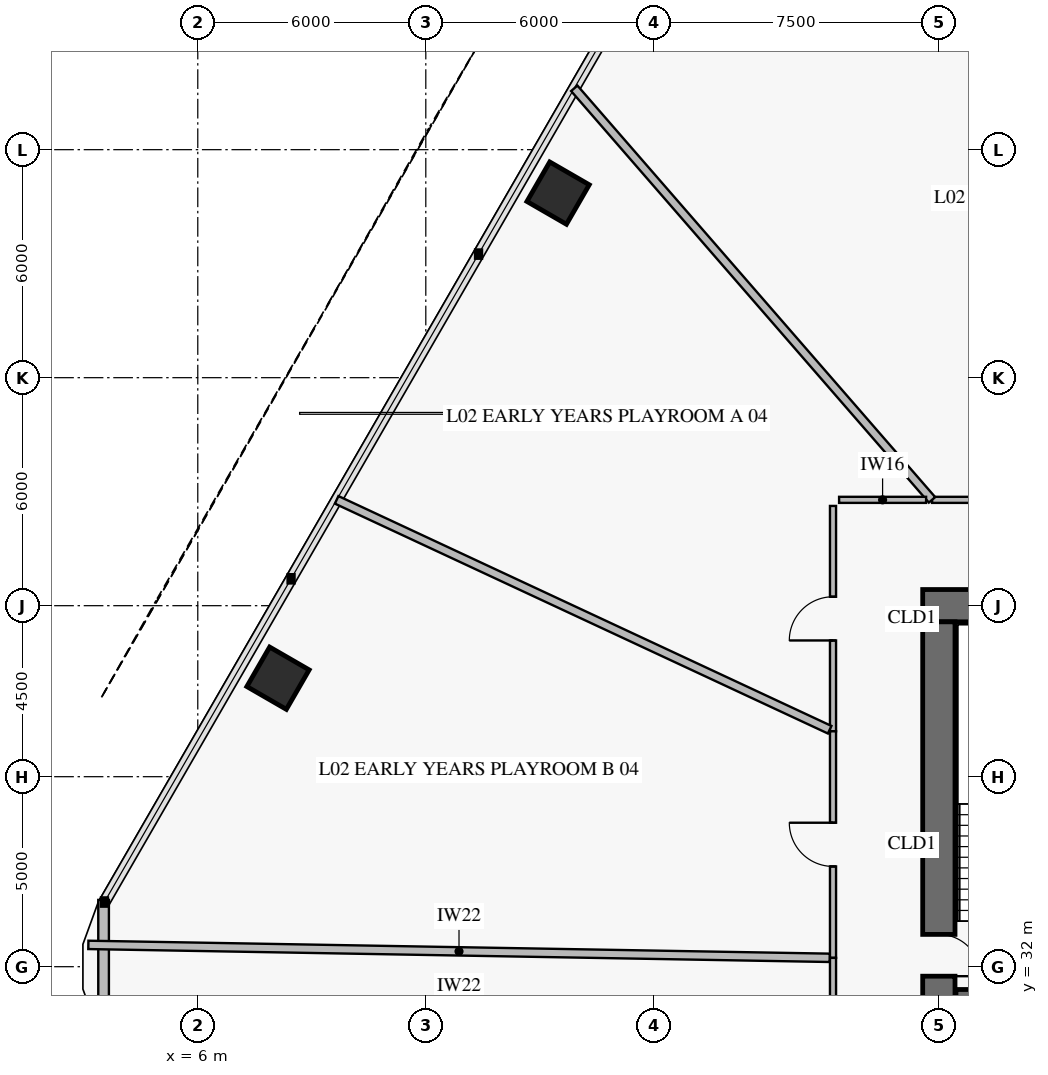
"""IFC4 building model, lengths in metres.
Left out: names, types, materials, properties, quantities, classifications, styles, units other than length and angle.
Written with IfcOpenShell. Run it as: python <this file> out.ifc"""

import sys

from ifc_helpers import new_model, si_unit, direction, frame, frame_2d, origin, origin_2d, place, context, subcontext, project, spatial, rectangle, extrude, element, fill, save


model = new_model("IFC4")
c1 = context("Model", 3, precision=1e-05, world=origin(), true_north=direction((0.0, 1.0)))
c2 = subcontext(c1, "Body", "Model", "MODEL_VIEW")
j1 = project(units=[si_unit("LENGTHUNIT", "METRE"), si_unit("PLANEANGLEUNIT", "RADIAN")], contexts=[c1])
p1 = place(None, origin())
s1 = spatial("IfcSite", under=j1, at=p1, CompositionType="ELEMENT")
p2 = place(p1, origin())
s2 = spatial("IfcBuilding", under=s1, at=p2, CompositionType="ELEMENT")
p3 = place(p2, frame((0.0, 0.0, 7.8)))
s3 = spatial("IfcBuildingStorey", under=s2, at=p3, CompositionType="ELEMENT", Elevation=7.8)
p4 = place(p3, frame((36.75, 41.5, 0.0), z_axis=(0.0, 0.0, 1.0), x_axis=(-1.0, 0.0, 0.0)))
e1 = element("IfcWall", 1, at=p4, inside=s3, PredefinedType="SHEAR", context=c2, shape_type="SweptSolid", body=[
    extrude(rectangle(XDim=11.675, YDim=0.85, at=frame_2d((5.837, 0.0))), origin(), (0.0, 0.0, 1.0), 4.2),
])
p5 = place(p4, frame((4.25, 0.0, 0.0)))
e2 = element("IfcOpeningElement", 2, at=p5, cuts=e1, PredefinedType="OPENING", context=c2, shape_type="SweptSolid", body=[
    extrude(rectangle(XDim=1.1, YDim=2.15, at=frame_2d((0.55, 1.075))), frame((0.0, 0.437, 0.0), z_axis=(0.0, -1.0, 0.0), x_axis=(1.0, 0.0, 0.0)), (0.0, 0.0, 1.0), 0.874),
])
p6 = place(p3, frame((25.5, 22.925, 0.0), z_axis=(0.0, 0.0, 1.0), x_axis=(0.0, 1.0, 0.0)))
e3 = element("IfcWall", 3, at=p6, inside=s3, PredefinedType="SHEAR", context=c2, shape_type="SweptSolid", body=[
    extrude(rectangle(XDim=18.15, YDim=0.85, at=frame_2d((9.075, 0.0))), origin(), (0.0, 0.0, 1.0), 4.2),
])
p7 = place(p6, frame((8.825, 0.0, 0.0)))
e4 = element("IfcOpeningElement", 4, at=p7, cuts=e3, PredefinedType="OPENING", context=c2, shape_type="SweptSolid", body=[
    extrude(rectangle(XDim=1.1, YDim=2.15, at=frame_2d((0.55, 1.075))), frame((0.0, 0.437, 0.0), z_axis=(0.0, -1.0, 0.0), x_axis=(1.0, 0.0, 0.0)), (0.0, 0.0, 1.0), 0.874),
])
for number, where, z_axis, x_axis in (
    (5, (15.481, 52.357, 0.0), (0.0, 0.0, 1.0), (-0.5, -0.866, 0.0)),
    (6, (8.111, 39.592, 0.0), (0.0, 0.0, 1.0), (-0.5, -0.866, 0.0)),
):
    element("IfcColumn", number, at=place(p3, frame(where, z_axis=z_axis, x_axis=x_axis)), inside=s3, PredefinedType="COLUMN", context=c2, shape_type="SweptSolid", body=[
        extrude(rectangle(XDim=1.2, YDim=1.2, at=origin_2d()), origin(), (0.0, 0.0, 1.0), 3.92),
    ])
p8 = place(p3, frame((3.521, 30.242, 0.0), z_axis=(0.0, 0.0, 1.0), x_axis=(0.0, 1.0, 0.0)))
e7 = element("IfcWall", 7, at=p8, inside=s3, PredefinedType="SOLIDWALL", context=c2, shape_type="SweptSolid", body=[
    extrude(rectangle(XDim=3.515, YDim=0.28, at=frame_2d((1.758, 0.0))), origin(), (0.0, 0.0, 1.0), 3.92),
])
p9 = place(p3, frame((25.95, 31.275, 0.0), z_axis=(0.0, 0.0, 1.0), x_axis=(1.0, 0.0, 0.0)))
e8 = element("IfcWall", 8, at=p9, inside=s3, PredefinedType="SOLIDWALL", context=c2, shape_type="SweptSolid", body=[
    extrude(rectangle(XDim=20.1, YDim=0.25, at=frame_2d((10.05, 0.0))), origin(), (0.0, 0.0, 1.0), 4.2),
])
p10 = place(p9, frame((2.6, 0.0, 0.0)))
e9 = element("IfcOpeningElement", 9, at=p10, cuts=e8, PredefinedType="OPENING", context=c2, shape_type="SweptSolid", body=[
    extrude(rectangle(XDim=1.1, YDim=2.15, at=frame_2d((0.55, 1.075))), frame((0.0, 0.137, 0.0), z_axis=(0.0, -1.0, 0.0), x_axis=(1.0, 0.0, 0.0)), (0.0, 0.0, 1.0), 0.274),
])
p11 = place(p9, frame((10.6, 0.0, 0.0)))
e10 = element("IfcOpeningElement", 10, at=p11, cuts=e8, PredefinedType="OPENING", context=c2, shape_type="SweptSolid", body=[
    extrude(rectangle(XDim=1.1, YDim=2.15, at=frame_2d((0.55, 1.075))), frame((0.0, 0.137, 0.0), z_axis=(0.0, -1.0, 0.0), x_axis=(1.0, 0.0, 0.0)), (0.0, 0.0, 1.0), 0.274),
])
p12 = place(p9, frame((16.35, 0.0, 0.0)))
e11 = element("IfcOpeningElement", 11, at=p12, cuts=e8, PredefinedType="OPENING", context=c2, shape_type="SweptSolid", body=[
    extrude(rectangle(XDim=1.1, YDim=2.15, at=frame_2d((0.55, 1.075))), frame((0.0, 0.137, 0.0), z_axis=(0.0, -1.0, 0.0), x_axis=(1.0, 0.0, 0.0)), (0.0, 0.0, 1.0), 0.274),
])
p13 = place(p3, frame((37.075, 44.285, 0.0), z_axis=(0.0, 0.0, 1.0), x_axis=(-1.0, 0.0, 0.0)))
e12 = element("IfcWall", 12, at=p13, inside=s3, PredefinedType="PARTITIONING", context=c2, shape_type="SweptSolid", body=[
    extrude(rectangle(XDim=11.754, YDim=0.16, at=frame_2d((5.877, 0.0))), origin(), (0.0, 0.0, 1.0), 3.22),
])
p14 = place(p13, frame((5.302, 0.0, 0.0)))
e13 = element("IfcOpeningElement", 13, at=p14, cuts=e12, PredefinedType="OPENING", context=c2, shape_type="SweptSolid", body=[
    extrude(rectangle(XDim=1.15, YDim=2.2, at=frame_2d((0.575, 1.1))), frame((0.0, 0.092, 0.0), z_axis=(0.0, -1.0, 0.0), x_axis=(1.0, 0.0, 0.0)), (0.0, 0.0, 1.0), 0.184),
])
p15 = place(p3, frame((22.715, 44.125, 0.0), z_axis=(0.0, 0.0, 1.0), x_axis=(0.0, -1.0, 0.0)))
e14 = element("IfcWall", 14, at=p15, inside=s3, PredefinedType="PARTITIONING", context=c2, shape_type="SweptSolid", body=[
    extrude(rectangle(XDim=5.93, YDim=0.16, at=frame_2d((2.965, 0.0))), origin(), (0.0, 0.0, 1.0), 3.92),
])
p16 = place(p15, frame((2.39, 0.0, 0.0)))
e15 = element("IfcOpeningElement", 15, at=p16, cuts=e14, PredefinedType="OPENING", context=c2, shape_type="SweptSolid", body=[
    extrude(rectangle(XDim=1.15, YDim=2.2, at=frame_2d((0.575, 1.1))), frame((0.0, 0.092, 0.0), z_axis=(0.0, -1.0, 0.0), x_axis=(1.0, 0.0, 0.0)), (0.0, 0.0, 1.0), 0.184),
])
p17 = place(p3, frame((22.715, 38.195, 0.0), z_axis=(0.0, 0.0, 1.0), x_axis=(0.0, -1.0, 0.0)))
e16 = element("IfcWall", 16, at=p17, inside=s3, PredefinedType="PARTITIONING", context=c2, shape_type="SweptSolid", body=[
    extrude(rectangle(XDim=5.963, YDim=0.16, at=frame_2d((2.981, 0.0))), origin(), (0.0, 0.0, 1.0), 3.22),
])
p18 = place(p17, frame((2.406, 0.0, 0.0)))
e17 = element("IfcOpeningElement", 17, at=p18, cuts=e16, PredefinedType="OPENING", context=c2, shape_type="SweptSolid", body=[
    extrude(rectangle(XDim=1.15, YDim=2.2, at=frame_2d((0.575, 1.1))), frame((0.0, 0.092, 0.0), z_axis=(0.0, -1.0, 0.0), x_axis=(1.0, 0.0, 0.0)), (0.0, 0.0, 1.0), 0.184),
])
p19 = place(p3, frame((22.715, 32.232, 0.0), z_axis=(0.0, 0.0, 1.0), x_axis=(0.0, -1.0, 0.0)))
e18 = element("IfcWall", 18, at=p19, inside=s3, PredefinedType="PARTITIONING", context=c2, shape_type="SweptSolid", body=[
    extrude(rectangle(XDim=5.599, YDim=0.16, at=frame_2d((2.8, 0.0))), origin(), (0.0, 0.0, 1.0), 3.22),
])
p20 = place(p19, frame((2.225, 0.0, 0.0)))
e19 = element("IfcOpeningElement", 19, at=p20, cuts=e18, PredefinedType="OPENING", context=c2, shape_type="SweptSolid", body=[
    extrude(rectangle(XDim=1.15, YDim=2.2, at=frame_2d((0.575, 1.1))), frame((0.0, 0.092, 0.0), z_axis=(0.0, -1.0, 0.0), x_axis=(1.0, 0.0, 0.0)), (0.0, 0.0, 1.0), 0.184),
])
p21 = place(p3, frame((25.321, 44.285, 0.0), z_axis=(0.0, 0.0, 1.0), x_axis=(-0.656060762546, 0.754708073263, 0.0)))
e20 = element("IfcWall", 20, at=p21, inside=s3, PredefinedType="PARTITIONING", context=c2, shape_type="SweptSolid", body=[
    extrude(rectangle(XDim=14.349, YDim=0.22, at=frame_2d((7.175, 0.0))), origin(), (0.0, 0.0, 1.0), 3.17),
])
p22 = place(p3, frame((22.627, 38.236, 0.0), z_axis=(0.0, 0.0, 1.0), x_axis=(-0.906309468756, 0.422614655263, 0.0)))
e21 = element("IfcWall", 21, at=p22, inside=s3, PredefinedType="PARTITIONING", context=c2, shape_type="SweptSolid", body=[
    extrude(rectangle(XDim=14.313, YDim=0.22, at=frame_2d((7.157, 0.0))), origin(), (0.0, 0.0, 1.0), 3.17),
])
p23 = place(p3, frame((25.164, 44.285, 0.0), z_axis=(0.0, 0.0, 1.0), x_axis=(-1.0, 0.0, 0.0)))
e22 = element("IfcWall", 22, at=p23, inside=s3, PredefinedType="PARTITIONING", context=c2, shape_type="SweptSolid", body=[
    extrude(rectangle(XDim=2.289, YDim=0.16, at=frame_2d((1.145, 0.0))), origin(), (0.0, 0.0, 1.0), 3.22),
])
p24 = place(p3, frame((22.627, 32.233, 0.0), z_axis=(0.0, 0.0, 1.0), x_axis=(-0.999847613209, 0.017457100559, 0.0)))
e23 = element("IfcWall", 23, at=p24, inside=s3, PredefinedType="PARTITIONING", context=c2, shape_type="SweptSolid", body=[
    extrude(rectangle(XDim=19.509, YDim=0.22, at=frame_2d((9.755, 0.0))), origin(), (0.0, 0.0, 1.0), 3.17),
])
p25 = place(p7, frame((1.1, 0.0, 0.0), z_axis=(0.0, 0.0, 1.0), x_axis=(-1.0, 0.0, 0.0)))
e24 = element("IfcDoor", 24, at=p25, inside=s3, OperationType="SINGLE_SWING_RIGHT", PredefinedType="USERDEFINED", context=c2, shape_type="SweptSolid", body=[
    extrude(rectangle(XDim=1.1, YDim=2.15, at=frame_2d((0.55, 1.075))), frame((0.0, 0.025, 0.0), z_axis=(0.0, -1.0, 0.0), x_axis=(1.0, 0.0, 0.0)), (0.0, 0.0, 1.0), 0.05),
])
fill(e4, e24)
p26 = place(p16, frame((1.15, 0.0, 0.0), z_axis=(0.0, 0.0, 1.0), x_axis=(-1.0, 0.0, 0.0)))
e25 = element("IfcDoor", 25, at=p26, inside=s3, OperationType="SINGLE_SWING_LEFT", PredefinedType="DOOR", context=c2, shape_type="SweptSolid", body=[
    extrude(rectangle(XDim=1.15, YDim=2.2, at=frame_2d((0.575, 1.1))), frame((0.0, 0.025, 0.0), z_axis=(0.0, -1.0, 0.0), x_axis=(1.0, 0.0, 0.0)), (0.0, 0.0, 1.0), 0.05),
])
fill(e15, e25)
p27 = place(p18, frame((1.15, 0.0, 0.0), z_axis=(0.0, 0.0, 1.0), x_axis=(-1.0, 0.0, 0.0)))
e26 = element("IfcDoor", 26, at=p27, inside=s3, OperationType="SINGLE_SWING_RIGHT", PredefinedType="DOOR", context=c2, shape_type="SweptSolid", body=[
    extrude(rectangle(XDim=1.15, YDim=2.2, at=frame_2d((0.575, 1.1))), frame((0.0, 0.025, 0.0), z_axis=(0.0, -1.0, 0.0), x_axis=(1.0, 0.0, 0.0)), (0.0, 0.0, 1.0), 0.05),
])
fill(e17, e26)
save(model, sys.argv[1])
